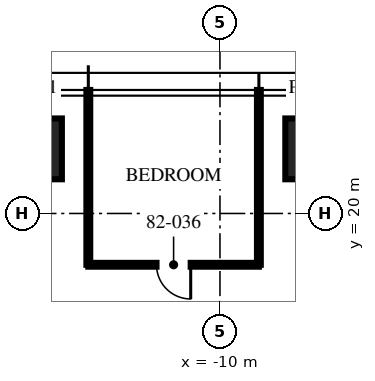
"""IFC4 building model, lengths in metres.
Left out: names, types, materials, properties, quantities, classifications, styles, units other than length and angle.
Written with IfcOpenShell. Run it as: python <this file> out.ifc"""

import sys

from ifc_helpers import new_model, si_unit, direction, frame, frame_2d, origin, origin_2d, place, context, subcontext, project, spatial, rectangle, extrude, element, fill, save


model = new_model("IFC4")
c1 = context("Model", 3, precision=1e-05, world=origin(), true_north=direction((0.0, 1.0)))
c2 = subcontext(c1, "Body", "Model", "MODEL_VIEW")
j1 = project(units=[si_unit("LENGTHUNIT", "METRE"), si_unit("PLANEANGLEUNIT", "RADIAN")], contexts=[c1])
p1 = place(None, origin())
s1 = spatial("IfcSite", under=j1, at=p1, CompositionType="ELEMENT")
p2 = place(p1, origin())
s2 = spatial("IfcBuilding", under=s1, at=p2, CompositionType="ELEMENT")
p3 = place(p2, frame((0.0, 0.0, 327.0)))
s3 = spatial("IfcBuildingStorey", under=s2, at=p3, CompositionType="ELEMENT", Elevation=327.0)
for number, where, z_axis, x_axis in (
    (1, (-14.96, 21.7, 0.0), (0.0, 0.0, 1.0), (1.0, 0.0, 0.0)),
    (2, (-7.48, 21.7, 0.0), (0.0, 0.0, 1.0), (1.0, 0.0, 0.0)),
):
    element("IfcColumn", number, at=place(p3, frame(where, z_axis=z_axis, x_axis=x_axis)), inside=s3, PredefinedType="COLUMN", context=c2, shape_type="SweptSolid", body=[
        extrude(rectangle(XDim=1.6, YDim=1.6, at=origin_2d()), origin(), (0.0, 0.0, 1.0), 3.75),
    ])
for number, where, z_axis, x_axis in (
    (3, (-8.976, 18.65, 0.0), (0.0, 0.0, 1.0), (0.0, 1.0, 0.0)),
    (4, (-13.464, 18.65, 0.0), (0.0, 0.0, 1.0), (0.0, 1.0, 0.0)),
):
    element("IfcWall", number, at=place(p3, frame(where, z_axis=z_axis, x_axis=x_axis)), inside=s3, PredefinedType="PARTITIONING", context=c2, shape_type="SweptSolid", body=[
        extrude(rectangle(XDim=4.6, YDim=0.1, at=frame_2d((2.3, 0.0))), origin(), (0.0, 0.0, 1.0), 3.01),
    ])
p4 = place(p3, frame((-8.976, 18.65, 0.0), z_axis=(0.0, 0.0, 1.0), x_axis=(-1.0, 0.0, 0.0)))
e5 = element("IfcWall", 5, at=p4, inside=s3, PredefinedType="PARTITIONING", context=c2, shape_type="SweptSolid", body=[
    extrude(rectangle(XDim=4.488, YDim=0.1, at=frame_2d((2.244, 0.0))), origin(), (0.0, 0.0, 1.0), 2.91),
])
p5 = place(p4, frame((1.794, 0.0, 0.0)))
e6 = element("IfcOpeningElement", 6, at=p5, cuts=e5, PredefinedType="OPENING", context=c2, shape_type="SweptSolid", body=[
    extrude(rectangle(XDim=0.9, YDim=2.1, at=frame_2d((0.45, 1.05))), frame((0.0, 0.06, 0.0), z_axis=(0.0, -1.0, 0.0), x_axis=(1.0, 0.0, 0.0)), (0.0, 0.0, 1.0), 0.12),
])
p6 = place(p5, origin())
e7 = element("IfcDoor", 7, at=p6, inside=s3, OperationType="SINGLE_SWING_LEFT", PredefinedType="DOOR", context=c2, shape_type="SweptSolid", body=[
    extrude(rectangle(XDim=0.9, YDim=2.1, at=frame_2d((0.45, 1.05))), frame((0.0, 0.025, 0.0), z_axis=(0.0, -1.0, 0.0), x_axis=(1.0, 0.0, 0.0)), (0.0, 0.0, 1.0), 0.05),
])
fill(e6, e7)
save(model, sys.argv[1])
